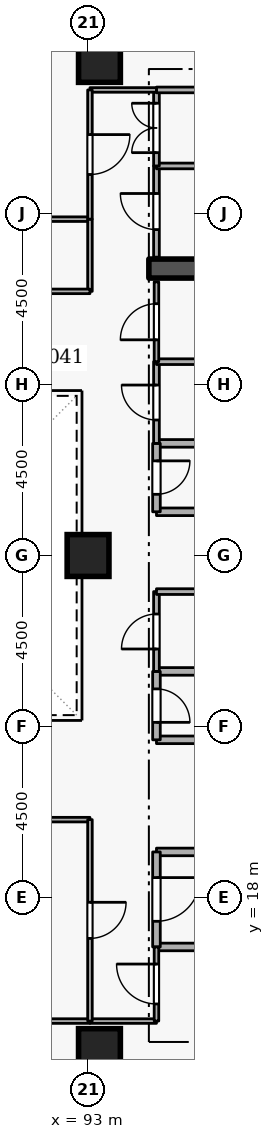
"""IFC4 building model, lengths in metres.
Left out: names, types, materials, properties, quantities, classifications, styles, units other than length and angle.
Written with IfcOpenShell. Run it as: python <this file> out.ifc"""

import sys

from ifc_helpers import new_model, si_unit, direction, frame, frame_2d, origin, origin_2d, place, context, subcontext, project, spatial, rectangle, extrude, element, fill, save


model = new_model("IFC4")
c1 = context("Model", 3, precision=1e-05, world=origin(), true_north=direction((0.0, 1.0)))
c2 = subcontext(c1, "Body", "Model", "MODEL_VIEW")
j1 = project(units=[si_unit("LENGTHUNIT", "METRE"), si_unit("PLANEANGLEUNIT", "RADIAN")], contexts=[c1])
p1 = place(None, origin())
s1 = spatial("IfcSite", under=j1, at=p1, CompositionType="ELEMENT")
p2 = place(p1, origin())
s2 = spatial("IfcBuilding", under=s1, at=p2, CompositionType="ELEMENT")
p3 = place(p2, frame((0.0, 0.0, 170.7)))
s3 = spatial("IfcBuildingStorey", under=s2, at=p3, CompositionType="ELEMENT", Elevation=170.7)
p4 = place(p3, frame((94.6, 34.55, 0.0), z_axis=(0.0, 0.0, 1.0), x_axis=(1.0, 0.0, 0.0)))
e1 = element("IfcWall", 1, at=p4, inside=s3, PredefinedType="SHEAR", context=c2, shape_type="SweptSolid", body=[
    extrude(rectangle(XDim=5.8, YDim=0.5, at=frame_2d((2.9, 0.0))), origin(), (0.0, 0.0, 1.0), 3.6),
])
for number, where, z_axis, x_axis in (
    (2, (93.3, 14.0, 0.0), (0.0, 0.0, 1.0), (1.0, 0.0, 0.0)),
    (3, (93.3, 40.0, 0.0), (0.0, 0.0, 1.0), (1.0, 0.0, 0.0)),
    (4, (93.0, 27.0, 0.0), (0.0, 0.0, 1.0), (1.0, 0.0, 0.0)),
):
    element("IfcColumn", number, at=place(p3, frame(where, z_axis=z_axis, x_axis=x_axis)), inside=s3, PredefinedType="COLUMN", context=c2, shape_type="SweptSolid", body=[
        extrude(rectangle(XDim=1.1, YDim=1.1, at=origin_2d()), origin(), (0.0, 0.0, 1.0), 3.6),
    ])
p5 = place(p3, frame((94.8, 16.7, 0.0), z_axis=(0.0, 0.0, 1.0), x_axis=(1.0, 0.0, 0.0)))
e5 = element("IfcWall", 5, at=p5, inside=s3, PredefinedType="STANDARD", context=c2, shape_type="SweptSolid", body=[
    extrude(rectangle(XDim=5.7, YDim=0.2, at=frame_2d((2.85, 0.0))), origin(), (0.0, 0.0, 1.0), 3.26),
])
p6 = place(p3, frame((97.1, 19.2, 0.0), z_axis=(0.0, 0.0, 1.0), x_axis=(-1.0, 0.0, 0.0)))
e6 = element("IfcWall", 6, at=p6, inside=s3, PredefinedType="STANDARD", context=c2, shape_type="SweptSolid", body=[
    extrude(rectangle(XDim=2.3, YDim=0.2, at=frame_2d((1.15, 0.0))), origin(), (0.0, 0.0, 1.0), 2.465),
])
p7 = place(p3, frame((94.8, 19.2, 0.0), z_axis=(0.0, 0.0, 1.0), x_axis=(0.0, -1.0, 0.0)))
e7 = element("IfcWall", 7, at=p7, inside=s3, PredefinedType="STANDARD", context=c2, shape_type="SweptSolid", body=[
    extrude(rectangle(XDim=2.5, YDim=0.2, at=frame_2d((1.25, 0.0))), origin(), (0.0, 0.0, 1.0), 3.26),
])
p8 = place(p7, frame((0.675, 0.0, 0.0)))
e8 = element("IfcOpeningElement", 8, at=p8, cuts=e7, PredefinedType="OPENING", context=c2, shape_type="SweptSolid", body=[
    extrude(rectangle(XDim=1.15, YDim=2.1, at=frame_2d((0.575, 1.05))), frame((0.0, 0.11, 0.0), z_axis=(0.0, -1.0, 0.0), x_axis=(1.0, 0.0, 0.0)), (0.0, 0.0, 1.0), 0.22),
])
for number, where, z_axis, x_axis in (
    (9, (94.8, 28.15, 0.0), (0.0, 0.0, 1.0), (1.0, 0.0, 0.0)),
    (10, (96.85, 29.95, 0.0), (0.0, 0.0, 1.0), (-1.0, 0.0, 0.0)),
):
    element("IfcWall", number, at=place(p3, frame(where, z_axis=z_axis, x_axis=x_axis)), inside=s3, PredefinedType="STANDARD", context=c2, shape_type="SweptSolid", body=[
        extrude(rectangle(XDim=2.05, YDim=0.2, at=frame_2d((1.025, 0.0))), origin(), (0.0, 0.0, 1.0), 3.26),
    ])
p9 = place(p3, frame((94.8, 29.95, 0.0), z_axis=(0.0, 0.0, 1.0), x_axis=(0.0, -1.0, 0.0)))
e11 = element("IfcWall", 11, at=p9, inside=s3, PredefinedType="STANDARD", context=c2, shape_type="SweptSolid", body=[
    extrude(rectangle(XDim=1.8, YDim=0.2, at=frame_2d((0.9, 0.0))), origin(), (0.0, 0.0, 1.0), 3.26),
])
p10 = place(p9, frame((0.46, 0.0, 0.0)))
e12 = element("IfcOpeningElement", 12, at=p10, cuts=e11, PredefinedType="OPENING", context=c2, shape_type="SweptSolid", body=[
    extrude(rectangle(XDim=0.88, YDim=2.04, at=frame_2d((0.44, 1.02))), frame((0.0, 0.11, 0.0), z_axis=(0.0, -1.0, 0.0), x_axis=(1.0, 0.0, 0.0)), (0.0, 0.0, 1.0), 0.22),
])
for number, where, z_axis, x_axis in (
    (13, (94.8, 22.15, 0.0), (0.0, 0.0, 1.0), (1.0, 0.0, 0.0)),
    (14, (96.85, 23.95, 0.0), (0.0, 0.0, 1.0), (-1.0, 0.0, 0.0)),
):
    element("IfcWall", number, at=place(p3, frame(where, z_axis=z_axis, x_axis=x_axis)), inside=s3, PredefinedType="STANDARD", context=c2, shape_type="SweptSolid", body=[
        extrude(rectangle(XDim=2.05, YDim=0.2, at=frame_2d((1.025, 0.0))), origin(), (0.0, 0.0, 1.0), 3.26),
    ])
p11 = place(p3, frame((94.8, 23.95, 0.0), z_axis=(0.0, 0.0, 1.0), x_axis=(0.0, -1.0, 0.0)))
e15 = element("IfcWall", 15, at=p11, inside=s3, PredefinedType="STANDARD", context=c2, shape_type="SweptSolid", body=[
    extrude(rectangle(XDim=1.8, YDim=0.2, at=frame_2d((0.9, 0.0))), origin(), (0.0, 0.0, 1.0), 3.26),
])
p12 = place(p11, frame((0.46, 0.0, 0.0)))
e16 = element("IfcOpeningElement", 16, at=p12, cuts=e15, PredefinedType="OPENING", context=c2, shape_type="SweptSolid", body=[
    extrude(rectangle(XDim=0.88, YDim=2.04, at=frame_2d((0.44, 1.02))), frame((0.0, 0.11, 0.0), z_axis=(0.0, -1.0, 0.0), x_axis=(1.0, 0.0, 0.0)), (0.0, 0.0, 1.0), 0.22),
])
p13 = place(p3, frame((94.8, 23.95, 0.0), z_axis=(0.0, 0.0, 1.0), x_axis=(0.0, 1.0, 0.0)))
e17 = element("IfcWall", 17, at=p13, inside=s3, PredefinedType="PARTITIONING", context=c2, shape_type="SweptSolid", body=[
    extrude(rectangle(XDim=2.1, YDim=0.15, at=frame_2d((1.05, 0.0))), origin(), (0.0, 0.0, 1.0), 3.26),
])
p14 = place(p13, frame((0.59, 0.0, 0.0)))
e18 = element("IfcOpeningElement", 18, at=p14, cuts=e17, PredefinedType="OPENING", context=c2, shape_type="SweptSolid", body=[
    extrude(rectangle(XDim=0.92, YDim=2.08, at=frame_2d((0.46, 1.04))), frame((0.0, 0.085, 0.0), z_axis=(0.0, -1.0, 0.0), x_axis=(1.0, 0.0, 0.0)), (0.0, 0.0, 1.0), 0.17),
])
p15 = place(p3, frame((94.8, 26.05, 0.0), z_axis=(0.0, 0.0, 1.0), x_axis=(1.0, 0.0, 0.0)))
e19 = element("IfcWall", 19, at=p15, inside=s3, PredefinedType="PARTITIONING", context=c2, shape_type="SweptSolid", body=[
    extrude(rectangle(XDim=2.05, YDim=0.15, at=frame_2d((1.025, 0.0))), origin(), (0.0, 0.0, 1.0), 3.26),
])
p16 = place(p3, frame((94.8, 29.95, 0.0), z_axis=(0.0, 0.0, 1.0), x_axis=(0.0, 1.0, 0.0)))
e20 = element("IfcWall", 20, at=p16, inside=s3, PredefinedType="PARTITIONING", context=c2, shape_type="SweptSolid", body=[
    extrude(rectangle(XDim=2.15, YDim=0.15, at=frame_2d((1.075, 0.0))), origin(), (0.0, 0.0, 1.0), 3.26),
])
p17 = place(p16, frame((0.615, 0.0, 0.0)))
e21 = element("IfcOpeningElement", 21, at=p17, cuts=e20, PredefinedType="OPENING", context=c2, shape_type="SweptSolid", body=[
    extrude(rectangle(XDim=0.92, YDim=2.08, at=frame_2d((0.46, 1.04))), frame((0.0, 0.085, 0.0), z_axis=(0.0, -1.0, 0.0), x_axis=(1.0, 0.0, 0.0)), (0.0, 0.0, 1.0), 0.17),
])
p18 = place(p3, frame((94.8, 32.1, 0.0), z_axis=(0.0, 0.0, 1.0), x_axis=(1.0, 0.0, 0.0)))
e22 = element("IfcWall", 22, at=p18, inside=s3, PredefinedType="PARTITIONING", context=c2, shape_type="SweptSolid", body=[
    extrude(rectangle(XDim=2.05, YDim=0.15, at=frame_2d((1.025, 0.0))), origin(), (0.0, 0.0, 1.0), 3.26),
])
p19 = place(p3, frame((94.8, 32.1, 0.0), z_axis=(0.0, 0.0, 1.0), x_axis=(0.0, 1.0, 0.0)))
e23 = element("IfcWall", 23, at=p19, inside=s3, PredefinedType="PARTITIONING", context=c2, shape_type="SweptSolid", body=[
    extrude(rectangle(XDim=2.1, YDim=0.12, at=frame_2d((1.05, 0.0))), origin(), (0.0, 0.0, 1.0), 3.26),
])
p20 = place(p19, frame((0.575, 0.0, 0.0)))
e24 = element("IfcOpeningElement", 24, at=p20, cuts=e23, PredefinedType="OPENING", context=c2, shape_type="SweptSolid", body=[
    extrude(rectangle(XDim=0.95, YDim=2.1, at=frame_2d((0.475, 1.05))), frame((0.0, 0.07, 0.0), z_axis=(0.0, -1.0, 0.0), x_axis=(1.0, 0.0, 0.0)), (0.0, 0.0, 1.0), 0.14),
])
p21 = place(p3, frame((94.8, 34.85, 0.0), z_axis=(0.0, 0.0, 1.0), x_axis=(0.0, 1.0, 0.0)))
e25 = element("IfcWall", 25, at=p21, inside=s3, PredefinedType="PARTITIONING", context=c2, shape_type="SweptSolid", body=[
    extrude(rectangle(XDim=2.4, YDim=0.15, at=frame_2d((1.2, 0.0))), origin(), (0.0, 0.0, 1.0), 3.26),
])
p22 = place(p21, frame((0.725, 0.0, 0.0)))
e26 = element("IfcOpeningElement", 26, at=p22, cuts=e25, PredefinedType="OPENING", context=c2, shape_type="SweptSolid", body=[
    extrude(rectangle(XDim=0.95, YDim=2.1, at=frame_2d((0.475, 1.05))), frame((0.0, 0.085, 0.0), z_axis=(0.0, -1.0, 0.0), x_axis=(1.0, 0.0, 0.0)), (0.0, 0.0, 1.0), 0.17),
])
p23 = place(p3, frame((94.8, 37.25, 0.0), z_axis=(0.0, 0.0, 1.0), x_axis=(1.0, 0.0, 0.0)))
e27 = element("IfcWall", 27, at=p23, inside=s3, PredefinedType="PARTITIONING", context=c2, shape_type="SweptSolid", body=[
    extrude(rectangle(XDim=5.65, YDim=0.15, at=frame_2d((2.825, 0.0))), origin(), (0.0, 0.0, 1.0), 3.26),
])
p24 = place(p3, frame((94.8, 37.25, 0.0), z_axis=(0.0, 0.0, 1.0), x_axis=(0.0, 1.0, 0.0)))
e28 = element("IfcWall", 28, at=p24, inside=s3, PredefinedType="PARTITIONING", context=c2, shape_type="SweptSolid", body=[
    extrude(rectangle(XDim=2.0, YDim=0.15, at=frame_2d((1.0, 0.0))), origin(), (0.0, 0.0, 1.0), 3.26),
])
p25 = place(p24, frame((0.35, 0.0, 0.0)))
e29 = element("IfcOpeningElement", 29, at=p25, cuts=e28, PredefinedType="OPENING", context=c2, shape_type="SweptSolid", body=[
    extrude(rectangle(XDim=1.3, YDim=2.12, at=frame_2d((0.65, 1.06))), frame((0.0, 0.085, 0.0), z_axis=(0.0, -1.0, 0.0), x_axis=(1.0, 0.0, 0.0)), (0.0, 0.0, 1.0), 0.17),
])
p26 = place(p3, frame((94.8, 39.25, 0.0), z_axis=(0.0, 0.0, 1.0), x_axis=(1.0, 0.0, 0.0)))
e30 = element("IfcWall", 30, at=p26, inside=s3, PredefinedType="PARTITIONING", context=c2, shape_type="SweptSolid", body=[
    extrude(rectangle(XDim=5.65, YDim=0.15, at=frame_2d((2.825, 0.0))), origin(), (0.0, 0.0, 1.0), 3.26),
])
p27 = place(p3, frame((88.5, 14.75, 0.0), z_axis=(0.0, 0.0, 1.0), x_axis=(1.0, 0.0, 0.0)))
e31 = element("IfcWall", 31, at=p27, inside=s3, PredefinedType="PARTITIONING", context=c2, shape_type="SweptSolid", body=[
    extrude(rectangle(XDim=4.55, YDim=0.12, at=frame_2d((2.275, 0.0))), origin(), (0.0, 0.0, 1.0), 3.26),
])
p28 = place(p3, frame((93.05, 14.75, 0.0), z_axis=(0.0, 0.0, 1.0), x_axis=(1.0, 0.0, 0.0)))
e32 = element("IfcWall", 32, at=p28, inside=s3, PredefinedType="PARTITIONING", context=c2, shape_type="SweptSolid", body=[
    extrude(rectangle(XDim=1.75, YDim=0.12, at=frame_2d((0.875, 0.0))), origin(), (0.0, 0.0, 1.0), 3.26),
])
p29 = place(p3, frame((94.8, 14.75, 0.0), z_axis=(0.0, 0.0, 1.0), x_axis=(0.0, 1.0, 0.0)))
e33 = element("IfcWall", 33, at=p29, inside=s3, PredefinedType="PARTITIONING", context=c2, shape_type="SweptSolid", body=[
    extrude(rectangle(XDim=1.95, YDim=0.12, at=frame_2d((0.975, 0.0))), origin(), (0.0, 0.0, 1.0), 3.26),
])
p30 = place(p29, frame((0.45, 0.0, 0.0)))
e34 = element("IfcOpeningElement", 34, at=p30, cuts=e33, PredefinedType="OPENING", context=c2, shape_type="SweptSolid", body=[
    extrude(rectangle(XDim=1.05, YDim=2.1, at=frame_2d((0.525, 1.05))), frame((0.0, 0.07, 0.0), z_axis=(0.0, -1.0, 0.0), x_axis=(1.0, 0.0, 0.0)), (0.0, 0.0, 1.0), 0.14),
])
p31 = place(p3, frame((88.5, 20.05, 0.0), z_axis=(0.0, 0.0, 1.0), x_axis=(1.0, 0.0, 0.0)))
e35 = element("IfcWall", 35, at=p31, inside=s3, PredefinedType="PARTITIONING", context=c2, shape_type="SweptSolid", body=[
    extrude(rectangle(XDim=4.55, YDim=0.12, at=frame_2d((2.275, 0.0))), origin(), (0.0, 0.0, 1.0), 3.26),
])
p32 = place(p3, frame((93.05, 20.05, 0.0), z_axis=(0.0, 0.0, 1.0), x_axis=(0.0, -1.0, 0.0)))
e36 = element("IfcWall", 36, at=p32, inside=s3, PredefinedType="PARTITIONING", context=c2, shape_type="SweptSolid", body=[
    extrude(rectangle(XDim=5.3, YDim=0.12, at=frame_2d((2.65, 0.0))), origin(), (0.0, 0.0, 1.0), 3.26),
])
p33 = place(p32, frame((2.175, 0.0, 0.0)))
e37 = element("IfcOpeningElement", 37, at=p33, cuts=e36, PredefinedType="OPENING", context=c2, shape_type="SweptSolid", body=[
    extrude(rectangle(XDim=0.95, YDim=2.1, at=frame_2d((0.475, 1.05))), frame((0.0, 0.07, 0.0), z_axis=(0.0, -1.0, 0.0), x_axis=(1.0, 0.0, 0.0)), (0.0, 0.0, 1.0), 0.14),
])
p34 = place(p3, frame((88.5, 35.85, 0.0), z_axis=(0.0, 0.0, 1.0), x_axis=(1.0, 0.0, 0.0)))
e38 = element("IfcWall", 38, at=p34, inside=s3, PredefinedType="PARTITIONING", context=c2, shape_type="SweptSolid", body=[
    extrude(rectangle(XDim=4.55, YDim=0.12, at=frame_2d((2.275, 0.0))), origin(), (0.0, 0.0, 1.0), 3.26),
])
p35 = place(p3, frame((93.05, 35.85, 0.0), z_axis=(0.0, 0.0, 1.0), x_axis=(0.0, -1.0, 0.0)))
e39 = element("IfcWall", 39, at=p35, inside=s3, PredefinedType="PARTITIONING", context=c2, shape_type="SweptSolid", body=[
    extrude(rectangle(XDim=1.9, YDim=0.12, at=frame_2d((0.95, 0.0))), origin(), (0.0, 0.0, 1.0), 3.26),
])
p36 = place(p3, frame((93.05, 33.95, 0.0), z_axis=(0.0, 0.0, 1.0), x_axis=(-1.0, 0.0, 0.0)))
e40 = element("IfcWall", 40, at=p36, inside=s3, PredefinedType="PARTITIONING", context=c2, shape_type="SweptSolid", body=[
    extrude(rectangle(XDim=4.55, YDim=0.12, at=frame_2d((2.275, 0.0))), origin(), (0.0, 0.0, 1.0), 3.26),
])
p37 = place(p36, frame((1.8, 0.0, 0.0)))
e41 = element("IfcOpeningElement", 41, at=p37, cuts=e40, PredefinedType="OPENING", context=c2, shape_type="SweptSolid", body=[
    extrude(rectangle(XDim=0.95, YDim=2.1, at=frame_2d((0.475, 1.05))), frame((0.0, 0.07, 0.0), z_axis=(0.0, -1.0, 0.0), x_axis=(1.0, 0.0, 0.0)), (0.0, 0.0, 1.0), 0.14),
])
p38 = place(p3, frame((94.8, 39.25, 0.0), z_axis=(0.0, 0.0, 1.0), x_axis=(-1.0, 0.0, 0.0)))
e42 = element("IfcWall", 42, at=p38, inside=s3, PredefinedType="PARTITIONING", context=c2, shape_type="SweptSolid", body=[
    extrude(rectangle(XDim=1.75, YDim=0.12, at=frame_2d((0.875, 0.0))), origin(), (0.0, 0.0, 1.0), 3.26),
])
p39 = place(p3, frame((93.05, 39.25, 0.0), z_axis=(0.0, 0.0, 1.0), x_axis=(0.0, -1.0, 0.0)))
e43 = element("IfcWall", 43, at=p39, inside=s3, PredefinedType="PARTITIONING", context=c2, shape_type="SweptSolid", body=[
    extrude(rectangle(XDim=3.4, YDim=0.12, at=frame_2d((1.7, 0.0))), origin(), (0.0, 0.0, 1.0), 3.26),
])
p40 = place(p39, frame((1.175, 0.0, 0.0)))
e44 = element("IfcOpeningElement", 44, at=p40, cuts=e43, PredefinedType="OPENING", context=c2, shape_type="SweptSolid", body=[
    extrude(rectangle(XDim=1.05, YDim=2.1, at=frame_2d((0.525, 1.05))), frame((0.0, 0.07, 0.0), z_axis=(0.0, -1.0, 0.0), x_axis=(1.0, 0.0, 0.0)), (0.0, 0.0, 1.0), 0.14),
])
p41 = place(p8, origin())
e45 = element("IfcDoor", 45, at=p41, inside=s3, OperationType="SINGLE_SWING_LEFT", PredefinedType="DOOR", context=c2, shape_type="SweptSolid", body=[
    extrude(rectangle(XDim=1.15, YDim=2.1, at=frame_2d((0.575, 1.05))), frame((0.0, 0.025, 0.0), z_axis=(0.0, -1.0, 0.0), x_axis=(1.0, 0.0, 0.0)), (0.0, 0.0, 1.0), 0.05),
])
fill(e8, e45)
p42 = place(p10, origin())
e46 = element("IfcDoor", 46, at=p42, inside=s3, OperationType="SINGLE_SWING_LEFT", PredefinedType="DOOR", context=c2, shape_type="SweptSolid", body=[
    extrude(rectangle(XDim=0.88, YDim=2.04, at=frame_2d((0.44, 1.02))), frame((0.0, 0.025, 0.0), z_axis=(0.0, -1.0, 0.0), x_axis=(1.0, 0.0, 0.0)), (0.0, 0.0, 1.0), 0.05),
])
fill(e12, e46)
p43 = place(p12, origin())
e47 = element("IfcDoor", 47, at=p43, inside=s3, OperationType="SINGLE_SWING_RIGHT", PredefinedType="DOOR", context=c2, shape_type="SweptSolid", body=[
    extrude(rectangle(XDim=0.88, YDim=2.04, at=frame_2d((0.44, 1.02))), frame((0.0, 0.025, 0.0), z_axis=(0.0, -1.0, 0.0), x_axis=(1.0, 0.0, 0.0)), (0.0, 0.0, 1.0), 0.05),
])
fill(e16, e47)
p44 = place(p14, origin())
e48 = element("IfcDoor", 48, at=p44, inside=s3, OperationType="SINGLE_SWING_LEFT", PredefinedType="DOOR", context=c2, shape_type="SweptSolid", body=[
    extrude(rectangle(XDim=0.92, YDim=2.08, at=frame_2d((0.46, 1.04))), frame((0.0, 0.025, 0.0), z_axis=(0.0, -1.0, 0.0), x_axis=(1.0, 0.0, 0.0)), (0.0, 0.0, 1.0), 0.05),
])
fill(e18, e48)
p45 = place(p17, origin())
e49 = element("IfcDoor", 49, at=p45, inside=s3, OperationType="SINGLE_SWING_RIGHT", PredefinedType="DOOR", context=c2, shape_type="SweptSolid", body=[
    extrude(rectangle(XDim=0.92, YDim=2.08, at=frame_2d((0.46, 1.04))), frame((0.0, 0.025, 0.0), z_axis=(0.0, -1.0, 0.0), x_axis=(1.0, 0.0, 0.0)), (0.0, 0.0, 1.0), 0.05),
])
fill(e21, e49)
p46 = place(p20, origin())
e50 = element("IfcDoor", 50, at=p46, inside=s3, OperationType="SINGLE_SWING_LEFT", PredefinedType="DOOR", context=c2, shape_type="SweptSolid", body=[
    extrude(rectangle(XDim=0.95, YDim=2.1, at=frame_2d((0.475, 1.05))), frame((0.0, 0.025, 0.0), z_axis=(0.0, -1.0, 0.0), x_axis=(1.0, 0.0, 0.0)), (0.0, 0.0, 1.0), 0.05),
])
fill(e24, e50)
p47 = place(p22, origin())
e51 = element("IfcDoor", 51, at=p47, inside=s3, OperationType="SINGLE_SWING_RIGHT", PredefinedType="DOOR", context=c2, shape_type="SweptSolid", body=[
    extrude(rectangle(XDim=0.95, YDim=2.1, at=frame_2d((0.475, 1.05))), frame((0.0, 0.025, 0.0), z_axis=(0.0, -1.0, 0.0), x_axis=(1.0, 0.0, 0.0)), (0.0, 0.0, 1.0), 0.05),
])
fill(e26, e51)
p48 = place(p25, origin())
e52 = element("IfcDoor", 52, at=p48, inside=s3, OperationType="DOUBLE_DOOR_SINGLE_SWING", PredefinedType="DOOR", context=c2, shape_type="SweptSolid", body=[
    extrude(rectangle(XDim=1.3, YDim=2.12, at=frame_2d((0.65, 1.06))), frame((0.0, 0.025, 0.0), z_axis=(0.0, -1.0, 0.0), x_axis=(1.0, 0.0, 0.0)), (0.0, 0.0, 1.0), 0.05),
])
fill(e29, e52)
p49 = place(p30, origin())
e53 = element("IfcDoor", 53, at=p49, inside=s3, OperationType="SINGLE_SWING_RIGHT", PredefinedType="DOOR", context=c2, shape_type="SweptSolid", body=[
    extrude(rectangle(XDim=1.05, YDim=2.1, at=frame_2d((0.525, 1.05))), frame((0.0, 0.025, 0.0), z_axis=(0.0, -1.0, 0.0), x_axis=(1.0, 0.0, 0.0)), (0.0, 0.0, 1.0), 0.05),
])
fill(e34, e53)
p50 = place(p33, origin())
e54 = element("IfcDoor", 54, at=p50, inside=s3, OperationType="SINGLE_SWING_LEFT", PredefinedType="DOOR", context=c2, shape_type="SweptSolid", body=[
    extrude(rectangle(XDim=0.95, YDim=2.1, at=frame_2d((0.475, 1.05))), frame((0.0, 0.025, 0.0), z_axis=(0.0, -1.0, 0.0), x_axis=(1.0, 0.0, 0.0)), (0.0, 0.0, 1.0), 0.05),
])
fill(e37, e54)
p51 = place(p40, origin())
e55 = element("IfcDoor", 55, at=p51, inside=s3, OperationType="SINGLE_SWING_LEFT", PredefinedType="DOOR", context=c2, shape_type="SweptSolid", body=[
    extrude(rectangle(XDim=1.05, YDim=2.1, at=frame_2d((0.525, 1.05))), frame((0.0, 0.025, 0.0), z_axis=(0.0, -1.0, 0.0), x_axis=(1.0, 0.0, 0.0)), (0.0, 0.0, 1.0), 0.05),
])
fill(e44, e55)
save(model, sys.argv[1])
